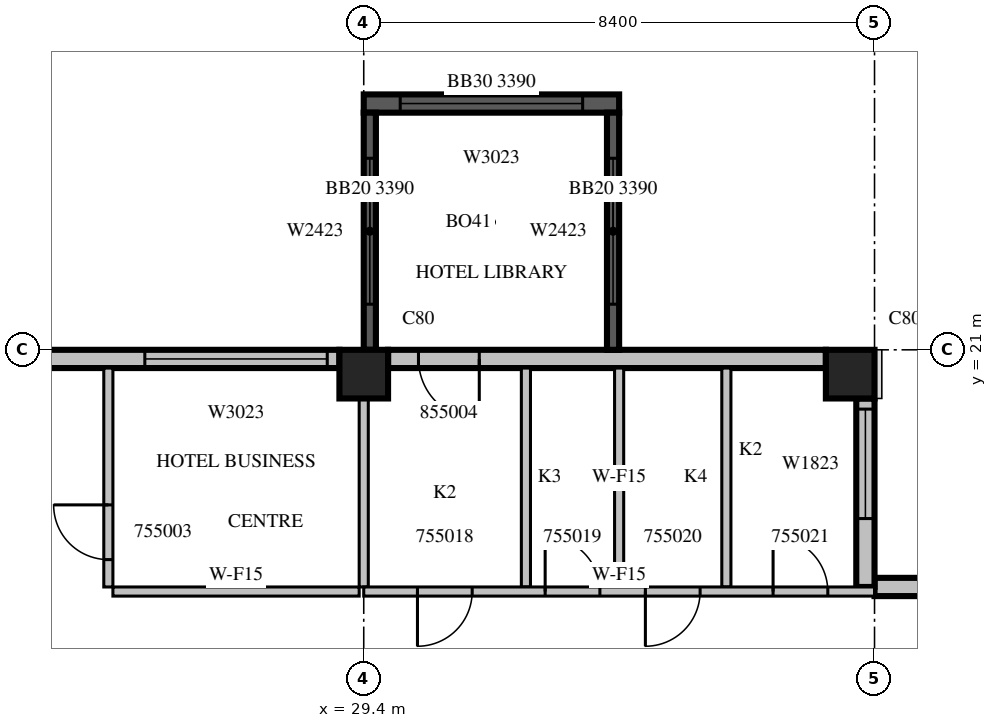
"""IFC4 building model, lengths in metres.
Left out: names, types, materials, properties, quantities, classifications, styles, units other than length and angle.
Written with IfcOpenShell. Run it as: python <this file> out.ifc"""

import sys

from ifc_helpers import new_model, si_unit, direction, frame, frame_2d, origin, origin_2d, place, context, subcontext, project, spatial, rectangle, extrude, source, transform, mapped, element, fill, save


model = new_model("IFC4")
c1 = context("Model", 3, precision=1e-05, world=origin(), true_north=direction((0.0, 1.0)))
c2 = subcontext(c1, "Body", "Model", "MODEL_VIEW")
j1 = project(units=[si_unit("LENGTHUNIT", "METRE"), si_unit("PLANEANGLEUNIT", "RADIAN")], contexts=[c1])
p1 = place(None, origin())
s1 = spatial("IfcSite", under=j1, at=p1, CompositionType="ELEMENT")
p2 = place(p1, origin())
s2 = spatial("IfcBuilding", under=s1, at=p2, CompositionType="ELEMENT")
p3 = place(p2, frame((0.0, 0.0, 242.4)))
s3 = spatial("IfcBuildingStorey", under=s2, at=p3, CompositionType="ELEMENT", Elevation=242.4)
m1 = source(origin(), c2, "Body", "SweptSolid", [
    extrude(rectangle(XDim=0.8, YDim=0.8, at=origin_2d()), origin(), (0.0, 0.0, 1.0), 3.8),
])
for number, where, z_axis, x_axis in (
    (1, (29.4, 20.6, 0.0), (0.0, 0.0, 1.0), (1.0, 0.0, 0.0)),
    (2, (37.4, 20.6, 0.0), (0.0, 0.0, 1.0), (1.0, 0.0, 0.0)),
):
    element("IfcColumn", number, at=place(p3, frame(where, z_axis=z_axis, x_axis=x_axis)), inside=s3, PredefinedType="COLUMN", context=c2, shape_type="MappedRepresentation", body=[
        mapped(m1, transform((0.0, 0.0, 0.0), scale=1.0)),
    ])
m2 = source(origin(), c2, "Body", "SweptSolid", [
    extrude(rectangle(XDim=15.96, YDim=0.3, at=frame_2d((7.98, 0.0))), origin(), (0.0, 0.0, 1.0), 3.4),
])
p4 = place(p3, frame((53.76, 17.1, 0.0), z_axis=(0.0, 0.0, 1.0), x_axis=(-1.0, 0.0, 0.0)))
e3 = element("IfcWall", 3, at=p4, inside=s3, PredefinedType="STANDARD", context=c2, shape_type="MappedRepresentation", body=[
    mapped(m2, transform((0.0, 0.0, 0.0), scale=1.0)),
])
m3 = source(origin(), c2, "Body", "SweptSolid", [
    extrude(rectangle(XDim=3.0, YDim=2.3, at=frame_2d((1.5, 1.15))), frame((0.0, 0.16, 0.0), z_axis=(0.0, -1.0, 0.0), x_axis=(1.0, 0.0, 0.0)), (0.0, 0.0, 1.0), 0.32),
])
p5 = place(p4, frame((0.6, 0.0, 0.6)))
e4 = element("IfcOpeningElement", 4, at=p5, cuts=e3, PredefinedType="OPENING", context=c2, shape_type="MappedRepresentation", body=[
    mapped(m3, transform((0.0, 0.0, 0.0), scale=1.0)),
])
p6 = place(p4, frame((4.8, 0.0, 0.6)))
e5 = element("IfcOpeningElement", 5, at=p6, cuts=e3, PredefinedType="OPENING", context=c2, shape_type="MappedRepresentation", body=[
    mapped(m3, transform((0.0, 0.0, 0.0), scale=1.0)),
])
m4 = source(origin(), c2, "Body", "SweptSolid", [
    extrude(rectangle(XDim=3.6, YDim=2.3, at=frame_2d((1.8, 1.15))), frame((0.0, 0.16, 0.0), z_axis=(0.0, -1.0, 0.0), x_axis=(1.0, 0.0, 0.0)), (0.0, 0.0, 1.0), 0.32),
])
p7 = place(p4, frame((9.54, 0.0, 0.6)))
e6 = element("IfcOpeningElement", 6, at=p7, cuts=e3, PredefinedType="OPENING", context=c2, shape_type="MappedRepresentation", body=[
    mapped(m4, transform((0.0, 0.0, 0.0), scale=1.0)),
])
m5 = source(origin(), c2, "Body", "SweptSolid", [
    extrude(rectangle(XDim=3.1, YDim=0.3, at=frame_2d((1.55, 0.0))), origin(), (0.0, 0.0, 1.0), 3.4),
])
p8 = place(p3, frame((37.65, 17.1, 0.0), z_axis=(0.0, 0.0, 1.0), x_axis=(0.0, 1.0, 0.0)))
e7 = element("IfcWall", 7, at=p8, inside=s3, PredefinedType="STANDARD", context=c2, shape_type="MappedRepresentation", body=[
    mapped(m5, transform((0.0, 0.0, 0.0), scale=1.0)),
])
m6 = source(origin(), c2, "Body", "SweptSolid", [
    extrude(rectangle(XDim=1.8, YDim=2.3, at=frame_2d((0.9, 1.15))), frame((0.0, 0.16, 0.0), z_axis=(0.0, -1.0, 0.0), x_axis=(1.0, 0.0, 0.0)), (0.0, 0.0, 1.0), 0.32),
])
p9 = place(p8, frame((1.125, 0.0, 0.6)))
e8 = element("IfcOpeningElement", 8, at=p9, cuts=e7, PredefinedType="OPENING", context=c2, shape_type="MappedRepresentation", body=[
    mapped(m6, transform((0.0, 0.0, 0.0), scale=1.0)),
])
m7 = source(origin(), c2, "Body", "SweptSolid", [
    extrude(rectangle(XDim=7.2, YDim=0.3, at=frame_2d((3.6, 0.0))), origin(), (0.0, 0.0, 1.0), 3.4),
])
p10 = place(p3, frame((37.0, 20.85, 0.0), z_axis=(0.0, 0.0, 1.0), x_axis=(-1.0, 0.0, 0.0)))
e9 = element("IfcWall", 9, at=p10, inside=s3, PredefinedType="STANDARD", context=c2, shape_type="MappedRepresentation", body=[
    mapped(m7, transform((0.0, 0.0, 0.0), scale=1.0)),
])
m8 = source(origin(), c2, "Body", "SweptSolid", [
    extrude(rectangle(XDim=1.0, YDim=2.1, at=frame_2d((0.5, 1.05))), frame((0.0, 0.16, 0.0), z_axis=(0.0, -1.0, 0.0), x_axis=(1.0, 0.0, 0.0)), (0.0, 0.0, 1.0), 0.32),
])
p11 = place(p10, frame((5.7, 0.0, 0.0)))
e10 = element("IfcOpeningElement", 10, at=p11, cuts=e9, PredefinedType="OPENING", context=c2, shape_type="MappedRepresentation", body=[
    mapped(m8, transform((0.0, 0.0, 0.0), scale=1.0)),
])
p12 = place(p3, frame((29.0, 20.85, 0.0), z_axis=(0.0, 0.0, 1.0), x_axis=(-1.0, 0.0, 0.0)))
e11 = element("IfcWall", 11, at=p12, inside=s3, PredefinedType="STANDARD", context=c2, shape_type="MappedRepresentation", body=[
    mapped(m7, transform((0.0, 0.0, 0.0), scale=1.0)),
])
p13 = place(p12, frame((0.2, 0.0, 0.6)))
e12 = element("IfcOpeningElement", 12, at=p13, cuts=e11, PredefinedType="OPENING", context=c2, shape_type="MappedRepresentation", body=[
    mapped(m3, transform((0.0, 0.0, 0.0), scale=1.0)),
])
p14 = place(p12, frame((5.0, 0.0, 0.6)))
e13 = element("IfcOpeningElement", 13, at=p14, cuts=e11, PredefinedType="OPENING", context=c2, shape_type="MappedRepresentation", body=[
    mapped(m6, transform((0.0, 0.0, 0.0), scale=1.0)),
])
m9 = source(origin(), c2, "Body", "SweptSolid", [
    extrude(rectangle(XDim=4.2, YDim=0.3, at=frame_2d((2.1, 0.0))), origin(), (0.0, 0.0, 1.0), 3.39),
])
p15 = place(p3, frame((33.6, 25.05, 0.0), z_axis=(0.0, 0.0, 1.0), x_axis=(-1.0, 0.0, 0.0)))
e14 = element("IfcWall", 14, at=p15, inside=s3, PredefinedType="SOLIDWALL", context=c2, shape_type="MappedRepresentation", body=[
    mapped(m9, transform((0.0, 0.0, 0.0), scale=1.0)),
])
p16 = place(p15, frame((0.6, 0.0, 0.6)))
e15 = element("IfcOpeningElement", 15, at=p16, cuts=e14, PredefinedType="OPENING", context=c2, shape_type="MappedRepresentation", body=[
    mapped(m3, transform((0.0, 0.0, 0.0), scale=1.0)),
])
m10 = source(origin(), c2, "Body", "SweptSolid", [
    extrude(rectangle(XDim=3.9, YDim=0.2, at=frame_2d((1.95, 0.0))), origin(), (0.0, 0.0, 1.0), 3.39),
])
p17 = place(p3, frame((33.5, 21.0, 0.0), z_axis=(0.0, 0.0, 1.0), x_axis=(0.0, 1.0, 0.0)))
e16 = element("IfcWall", 16, at=p17, inside=s3, PredefinedType="SOLIDWALL", context=c2, shape_type="MappedRepresentation", body=[
    mapped(m10, transform((0.0, 0.0, 0.0), scale=1.0)),
])
m11 = source(origin(), c2, "Body", "SweptSolid", [
    extrude(rectangle(XDim=2.4, YDim=2.3, at=frame_2d((1.2, 1.15))), frame((0.0, 0.11, 0.0), z_axis=(0.0, -1.0, 0.0), x_axis=(1.0, 0.0, 0.0)), (0.0, 0.0, 1.0), 0.22),
])
p18 = place(p17, frame((0.75, 0.0, 0.6)))
e17 = element("IfcOpeningElement", 17, at=p18, cuts=e16, PredefinedType="OPENING", context=c2, shape_type="MappedRepresentation", body=[
    mapped(m11, transform((0.0, 0.0, 0.0), scale=1.0)),
])
p19 = place(p3, frame((29.5, 21.0, 0.0), z_axis=(0.0, 0.0, 1.0), x_axis=(0.0, 1.0, 0.0)))
e18 = element("IfcWall", 18, at=p19, inside=s3, PredefinedType="SOLIDWALL", context=c2, shape_type="MappedRepresentation", body=[
    mapped(m10, transform((0.0, 0.0, 0.0), scale=1.0)),
])
p20 = place(p19, frame((0.75, 0.0, 0.6)))
e19 = element("IfcOpeningElement", 19, at=p20, cuts=e18, PredefinedType="OPENING", context=c2, shape_type="MappedRepresentation", body=[
    mapped(m11, transform((0.0, 0.0, 0.0), scale=1.0)),
])
m12 = source(origin(), c2, "Body", "SweptSolid", [
    extrude(rectangle(XDim=3.6, YDim=0.15, at=frame_2d((1.8, 0.0))), origin(), (0.0, 0.0, 1.0), 3.4),
])
p21 = place(p3, frame((25.2, 20.7, 0.0), z_axis=(0.0, 0.0, 1.0), x_axis=(0.0, -1.0, 0.0)))
e20 = element("IfcWall", 20, at=p21, inside=s3, PredefinedType="PARTITIONING", context=c2, shape_type="MappedRepresentation", body=[
    mapped(m12, transform((0.0, 0.0, 0.0), scale=1.0)),
])
m13 = source(origin(), c2, "Body", "SweptSolid", [
    extrude(rectangle(XDim=0.9, YDim=2.1, at=frame_2d((0.45, 1.05))), frame((0.0, 0.085, 0.0), z_axis=(0.0, -1.0, 0.0), x_axis=(1.0, 0.0, 0.0)), (0.0, 0.0, 1.0), 0.17),
])
p22 = place(p21, frame((2.25, 0.0, 0.0)))
e21 = element("IfcOpeningElement", 21, at=p22, cuts=e20, PredefinedType="OPENING", context=c2, shape_type="MappedRepresentation", body=[
    mapped(m13, transform((0.0, 0.0, 0.0), scale=1.0)),
])
m14 = source(origin(), c2, "Body", "SweptSolid", [
    extrude(rectangle(XDim=4.05, YDim=0.15, at=frame_2d((2.025, 0.0))), origin(), (0.0, 0.0, 1.0), 3.4),
])
p23 = place(p3, frame((25.275, 17.025, 0.0), z_axis=(0.0, 0.0, 1.0), x_axis=(1.0, 0.0, 0.0)))
e22 = element("IfcWall", 22, at=p23, inside=s3, PredefinedType="PARTITIONING", context=c2, shape_type="MappedRepresentation", body=[
    mapped(m14, transform((0.0, 0.0, 0.0), scale=1.0)),
])
m15 = source(origin(), c2, "Body", "SweptSolid", [
    extrude(rectangle(XDim=3.101, YDim=0.15, at=frame_2d((1.55, 0.0))), origin(), (0.0, 0.0, 1.0), 3.4),
])
p24 = place(p3, frame((29.4, 17.1, 0.0), z_axis=(0.0, 0.0, 1.0), x_axis=(0.0, 1.0, 0.0)))
e23 = element("IfcWall", 23, at=p24, inside=s3, PredefinedType="PARTITIONING", context=c2, shape_type="MappedRepresentation", body=[
    mapped(m15, transform((0.0, 0.0, 0.0), scale=1.0)),
])
for number, where, z_axis, x_axis in (
    (24, (32.067, 20.7, 0.0), (0.0, 0.0, 1.0), (0.0, -1.0, 0.0)),
    (25, (35.363, 20.7, 0.0), (0.0, 0.0, 1.0), (0.0, -1.0, 0.0)),
    (26, (33.6, 17.1, 0.0), (0.0, 0.0, 1.0), (0.0, 1.0, 0.0)),
):
    element("IfcWall", number, at=place(p3, frame(where, z_axis=z_axis, x_axis=x_axis)), inside=s3, PredefinedType="PARTITIONING", context=c2, shape_type="MappedRepresentation", body=[
        mapped(m12, transform((0.0, 0.0, 0.0), scale=1.0)),
    ])
m16 = source(origin(), c2, "Body", "SweptSolid", [
    extrude(rectangle(XDim=8.4, YDim=0.15, at=frame_2d((4.2, 0.0))), origin(), (0.0, 0.0, 1.0), 3.4),
])
p25 = place(p3, frame((29.4, 17.025, 0.0), z_axis=(0.0, 0.0, 1.0), x_axis=(1.0, 0.0, 0.0)))
e27 = element("IfcWall", 27, at=p25, inside=s3, PredefinedType="PARTITIONING", context=c2, shape_type="MappedRepresentation", body=[
    mapped(m16, transform((0.0, 0.0, 0.0), scale=1.0)),
])
p26 = place(p25, frame((0.883, 0.0, 0.0)))
e28 = element("IfcOpeningElement", 28, at=p26, cuts=e27, PredefinedType="OPENING", context=c2, shape_type="MappedRepresentation", body=[
    mapped(m13, transform((0.0, 0.0, 0.0), scale=1.0)),
])
p27 = place(p25, frame((2.983, 0.0, 0.0)))
e29 = element("IfcOpeningElement", 29, at=p27, cuts=e27, PredefinedType="OPENING", context=c2, shape_type="MappedRepresentation", body=[
    mapped(m13, transform((0.0, 0.0, 0.0), scale=1.0)),
])
p28 = place(p25, frame((4.632, 0.0, 0.0)))
e30 = element("IfcOpeningElement", 30, at=p28, cuts=e27, PredefinedType="OPENING", context=c2, shape_type="MappedRepresentation", body=[
    mapped(m13, transform((0.0, 0.0, 0.0), scale=1.0)),
])
p29 = place(p25, frame((6.732, 0.0, 0.0)))
e31 = element("IfcOpeningElement", 31, at=p29, cuts=e27, PredefinedType="OPENING", context=c2, shape_type="MappedRepresentation", body=[
    mapped(m13, transform((0.0, 0.0, 0.0), scale=1.0)),
])
m17 = source(origin(), c2, "Body", "SweptSolid", [
    extrude(rectangle(XDim=1.8, YDim=2.3, at=frame_2d((0.9, 1.15))), frame((0.0, 0.03, 0.0), z_axis=(0.0, -1.0, 0.0), x_axis=(1.0, 0.0, 0.0)), (0.0, 0.0, 1.0), 0.06),
])
p30 = place(p9, origin())
e32 = element("IfcWindow", 32, at=p30, inside=s3, PartitioningType="SINGLE_PANEL", PredefinedType="WINDOW", context=c2, shape_type="MappedRepresentation", body=[
    mapped(m17, transform((0.0, 0.0, 0.0), scale=1.0)),
])
fill(e8, e32)
m18 = source(origin(), c2, "Body", "SweptSolid", [
    extrude(rectangle(XDim=3.0, YDim=2.3, at=frame_2d((1.5, 1.15))), frame((0.0, 0.03, 0.0), z_axis=(0.0, -1.0, 0.0), x_axis=(1.0, 0.0, 0.0)), (0.0, 0.0, 1.0), 0.06),
])
p31 = place(p13, origin())
e33 = element("IfcWindow", 33, at=p31, inside=s3, PartitioningType="SINGLE_PANEL", PredefinedType="WINDOW", context=c2, shape_type="MappedRepresentation", body=[
    mapped(m18, transform((0.0, 0.0, 0.0), scale=1.0)),
])
fill(e12, e33)
p32 = place(p16, origin())
e34 = element("IfcWindow", 34, at=p32, inside=s3, PartitioningType="SINGLE_PANEL", PredefinedType="WINDOW", context=c2, shape_type="MappedRepresentation", body=[
    mapped(m18, transform((0.0, 0.0, 0.0), scale=1.0)),
])
fill(e15, e34)
m19 = source(origin(), c2, "Body", "SweptSolid", [
    extrude(rectangle(XDim=2.4, YDim=2.3, at=frame_2d((1.2, 1.15))), frame((0.0, 0.03, 0.0), z_axis=(0.0, -1.0, 0.0), x_axis=(1.0, 0.0, 0.0)), (0.0, 0.0, 1.0), 0.06),
])
p33 = place(p18, origin())
e35 = element("IfcWindow", 35, at=p33, inside=s3, PartitioningType="SINGLE_PANEL", PredefinedType="WINDOW", context=c2, shape_type="MappedRepresentation", body=[
    mapped(m19, transform((0.0, 0.0, 0.0), scale=1.0)),
])
fill(e17, e35)
p34 = place(p20, origin())
e36 = element("IfcWindow", 36, at=p34, inside=s3, PartitioningType="SINGLE_PANEL", PredefinedType="WINDOW", context=c2, shape_type="MappedRepresentation", body=[
    mapped(m19, transform((0.0, 0.0, 0.0), scale=1.0)),
])
fill(e19, e36)
m20 = source(origin(), c2, "Body", "SweptSolid", [
    extrude(rectangle(XDim=0.9, YDim=2.1, at=frame_2d((0.45, 1.05))), frame((0.0, 0.025, 0.0), z_axis=(0.0, -1.0, 0.0), x_axis=(1.0, 0.0, 0.0)), (0.0, 0.0, 1.0), 0.05),
])
p35 = place(p22, origin())
e37 = element("IfcDoor", 37, at=p35, inside=s3, OperationType="SINGLE_SWING_RIGHT", PredefinedType="DOOR", context=c2, shape_type="MappedRepresentation", body=[
    mapped(m20, transform((0.0, 0.0, 0.0), scale=1.0)),
])
fill(e21, e37)
p36 = place(p26, origin())
e38 = element("IfcDoor", 38, at=p36, inside=s3, OperationType="SINGLE_SWING_RIGHT", PredefinedType="DOOR", context=c2, shape_type="MappedRepresentation", body=[
    mapped(m20, transform((0.0, 0.0, 0.0), scale=1.0)),
])
fill(e28, e38)
p37 = place(p27, origin())
e39 = element("IfcDoor", 39, at=p37, inside=s3, OperationType="SINGLE_SWING_LEFT", PredefinedType="DOOR", context=c2, shape_type="MappedRepresentation", body=[
    mapped(m20, transform((0.0, 0.0, 0.0), scale=1.0)),
])
fill(e29, e39)
p38 = place(p28, origin())
e40 = element("IfcDoor", 40, at=p38, inside=s3, OperationType="SINGLE_SWING_RIGHT", PredefinedType="DOOR", context=c2, shape_type="MappedRepresentation", body=[
    mapped(m20, transform((0.0, 0.0, 0.0), scale=1.0)),
])
fill(e30, e40)
p39 = place(p29, origin())
e41 = element("IfcDoor", 41, at=p39, inside=s3, OperationType="SINGLE_SWING_LEFT", PredefinedType="DOOR", context=c2, shape_type="MappedRepresentation", body=[
    mapped(m20, transform((0.0, 0.0, 0.0), scale=1.0)),
])
fill(e31, e41)
m21 = source(origin(), c2, "Body", "SweptSolid", [
    extrude(rectangle(XDim=1.0, YDim=2.1, at=frame_2d((0.5, 1.05))), frame((0.0, 0.025, 0.0), z_axis=(0.0, -1.0, 0.0), x_axis=(1.0, 0.0, 0.0)), (0.0, 0.0, 1.0), 0.05),
])
p40 = place(p11, origin())
e42 = element("IfcDoor", 42, at=p40, inside=s3, OperationType="SINGLE_SWING_LEFT", PredefinedType="DOOR", context=c2, shape_type="MappedRepresentation", body=[
    mapped(m21, transform((0.0, 0.0, 0.0), scale=1.0)),
])
fill(e10, e42)
save(model, sys.argv[1])
